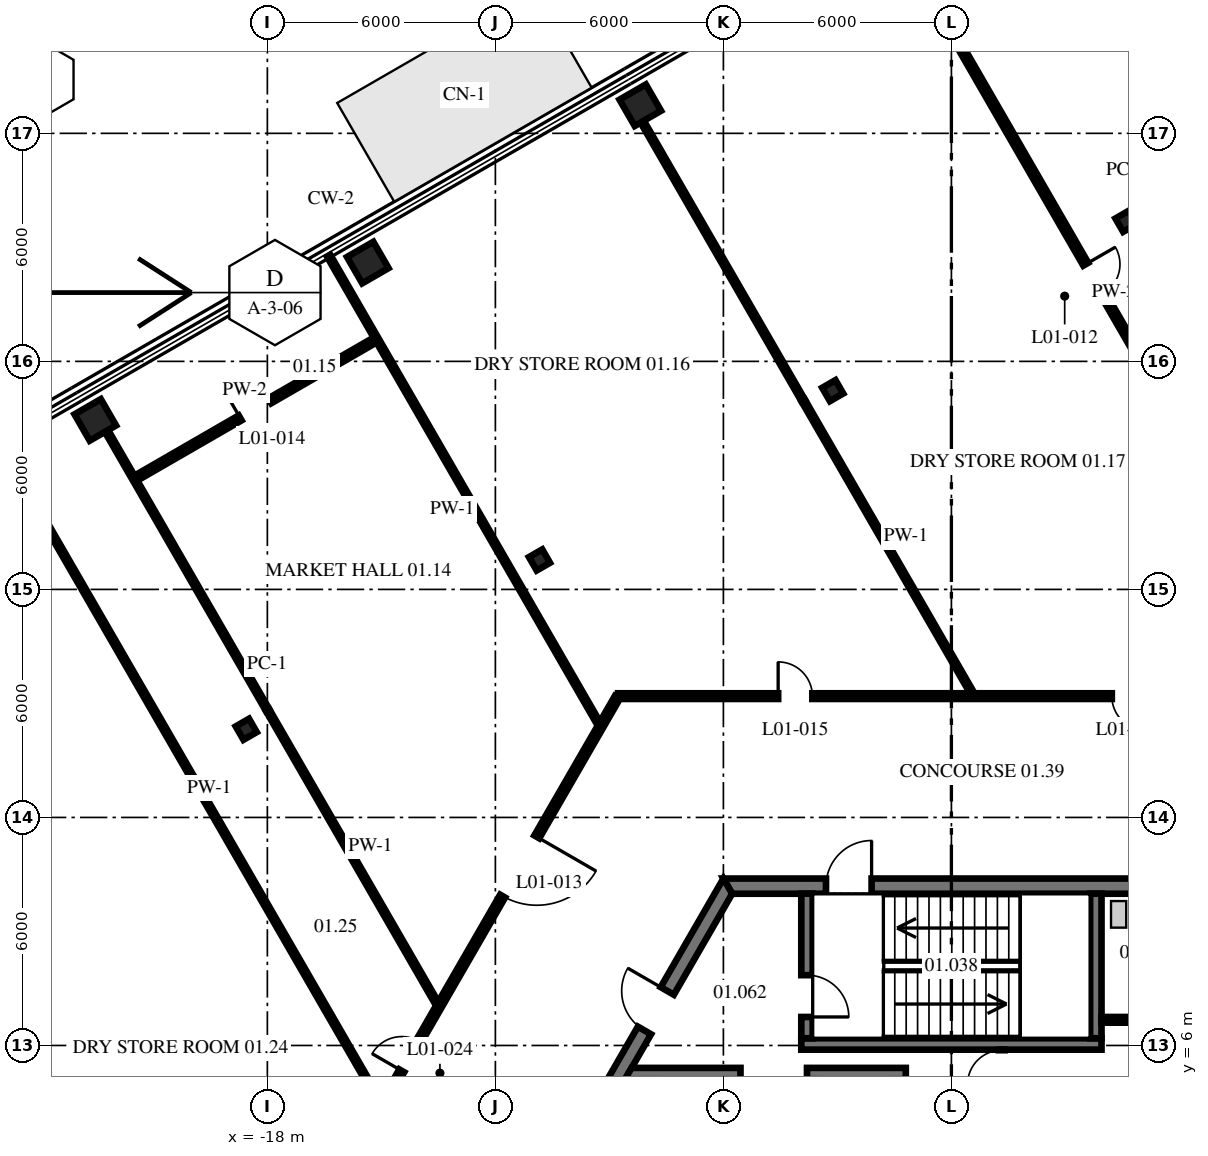
"""IFC4 building model, lengths in metres.
Left out: names, types, materials, properties, quantities, classifications, styles, units other than length and angle.
Written with IfcOpenShell. Run it as: python <this file> out.ifc"""

import sys

from ifc_helpers import new_model, si_unit, direction, frame, frame_2d, origin, origin_2d, place, context, subcontext, project, spatial, polyline, rectangle, i_section, outline, extrude, source, transform, mapped, element, fill, save


model = new_model("IFC4")
c1 = context("Model", 3, precision=1e-05, world=origin(), true_north=direction((0.0, 1.0)))
c2 = subcontext(c1, "Body", "Model", "MODEL_VIEW")
j1 = project(units=[si_unit("LENGTHUNIT", "METRE"), si_unit("PLANEANGLEUNIT", "RADIAN")], contexts=[c1])
p1 = place(None, origin())
s1 = spatial("IfcSite", under=j1, at=p1, CompositionType="ELEMENT")
p2 = place(p1, origin())
s2 = spatial("IfcBuilding", under=s1, at=p2, CompositionType="ELEMENT")
p3 = place(p2, frame((0.0, 0.0, 7.0)))
s3 = spatial("IfcBuildingStorey", under=s2, at=p3, CompositionType="ELEMENT", Elevation=7.0)
m1 = source(origin(), c2, "Body", "SweptSolid", [
    extrude(i_section(OverallWidth=0.404, OverallDepth=0.406, WebThickness=0.027, FlangeThickness=0.044, at=origin_2d()), origin(), (0.0, 0.0, 1.0), 4.5),
])
for number, where, z_axis, x_axis in (
    (1, (4.593, 27.685, 0.0), (0.0, 0.0, 1.0), (-0.866, -0.5, 0.0)),
    (2, (-3.124, 23.23, 0.0), (0.0, 0.0, 1.0), (-0.866, -0.5, 0.0)),
    (3, (-10.84, 18.775, 0.0), (0.0, 0.0, 1.0), (-0.866, -0.5, 0.0)),
    (4, (-18.556, 14.32, 0.0), (0.0, 0.0, 1.0), (-0.866, -0.5, 0.0)),
):
    element("IfcColumn", number, at=place(p3, frame(where, z_axis=z_axis, x_axis=x_axis)), inside=s3, PredefinedType="COLUMN", context=c2, shape_type="MappedRepresentation", body=[
        mapped(m1, transform((0.0, 0.0, 0.0), scale=1.0)),
    ])
m2 = source(origin(), c2, "Body", "SweptSolid", [
    extrude(rectangle(XDim=0.8, YDim=0.8, at=origin_2d()), origin(), (0.0, 0.0, 1.0), 4.5),
])
for number, where, z_axis, x_axis in (
    (5, (-8.187, 30.74, 0.0), (0.0, 0.0, 1.0), (-0.866, -0.5, 0.0)),
    (6, (-15.357, 26.6, 0.0), (0.0, 0.0, 1.0), (-0.866, -0.5, 0.0)),
    (7, (-22.528, 22.46, 0.0), (0.0, 0.0, 1.0), (-0.866, -0.5, 0.0)),
):
    element("IfcColumn", number, at=place(p3, frame(where, z_axis=z_axis, x_axis=x_axis)), inside=s3, PredefinedType="COLUMN", context=c2, shape_type="MappedRepresentation", body=[
        mapped(m2, transform((0.0, 0.0, 0.0), scale=1.0)),
    ])
m3 = source(origin(), c2, "Body", "SweptSolid", [
    extrude(outline(polyline([(-0.115, -0.2), (11.885, -0.2), (11.654, 0.2), (0.115, 0.2), (-0.115, -0.2)])), origin(), (0.0, 0.0, 1.0), 4.3),
])
p4 = place(p3, frame((5.885, 10.192, 0.0), z_axis=(0.0, 0.0, 1.0), x_axis=(-1.0, 0.0, 0.0)))
e8 = element("IfcWall", 8, at=p4, inside=s3, PredefinedType="SHEAR", context=c2, shape_type="MappedRepresentation", body=[
    mapped(m3, transform((0.0, 0.0, 0.0), scale=1.0)),
])
p5 = place(p4, frame((7.985, 0.0, 0.0)))
e9 = element("IfcOpeningElement", 9, at=p5, cuts=e8, PredefinedType="OPENING", context=c2, shape_type="SweptSolid", body=[
    extrude(rectangle(XDim=1.2, YDim=2.1, at=frame_2d((0.6, 1.05))), frame((0.0, 0.21, 0.0), z_axis=(0.0, -1.0, 0.0), x_axis=(1.0, 0.0, 0.0)), (0.0, 0.0, 1.0), 0.42),
])
p6 = place(p3, frame((-5.885, 10.192, 0.0), z_axis=(0.0, 0.0, 1.0), x_axis=(-0.499996592174, -0.866027371285, 0.0)))
e10 = element("IfcWall", 10, at=p6, inside=s3, PredefinedType="SHEAR", context=c2, shape_type="MappedRepresentation", body=[
    mapped(m3, transform((0.0, 0.0, 0.0), scale=1.0)),
])
p7 = place(p6, frame((3.185, 0.0, 0.0)))
e11 = element("IfcOpeningElement", 11, at=p7, cuts=e10, PredefinedType="OPENING", context=c2, shape_type="SweptSolid", body=[
    extrude(rectangle(XDim=1.2, YDim=2.1, at=frame_2d((0.6, 1.05))), frame((0.0, 0.21, 0.0), z_axis=(0.0, -1.0, 0.0), x_axis=(1.0, 0.0, 0.0)), (0.0, 0.0, 1.0), 0.42),
])
m4 = source(origin(), c2, "Body", "SweptSolid", [
    extrude(rectangle(XDim=7.9, YDim=0.3, at=frame_2d((3.95, 0.0))), origin(), (0.0, 0.0, 1.0), 4.3),
])
p8 = place(p3, frame((-3.95, 6.04, 0.0), z_axis=(0.0, 0.0, 1.0), x_axis=(1.0, 0.0, 0.0)))
e12 = element("IfcWall", 12, at=p8, inside=s3, PredefinedType="SHEAR", context=c2, shape_type="MappedRepresentation", body=[
    mapped(m4, transform((0.0, 0.0, 0.0), scale=1.0)),
])
m5 = source(origin(), c2, "Body", "SweptSolid", [
    extrude(outline(polyline([(0.0, -0.15), (0.0, 0.15), (3.804, 0.15), (3.804, -0.15), (0.0, -0.15)])), origin(), (0.0, 0.0, 1.0), 4.3),
])
p9 = place(p3, frame((-3.8, 6.19, 0.0), z_axis=(0.0, 0.0, 1.0), x_axis=(0.0, 1.0, 0.0)))
e13 = element("IfcWall", 13, at=p9, inside=s3, PredefinedType="SHEAR", context=c2, shape_type="MappedRepresentation", body=[
    mapped(m5, transform((0.0, 0.0, 0.0), scale=1.0)),
])
p10 = place(p9, frame((0.56, 0.0, 0.0)))
e14 = element("IfcOpeningElement", 14, at=p10, cuts=e13, PredefinedType="OPENING", context=c2, shape_type="SweptSolid", body=[
    extrude(rectangle(XDim=1.1, YDim=2.1, at=frame_2d((0.55, 1.05))), frame((0.0, 0.16, 0.0), z_axis=(0.0, -1.0, 0.0), x_axis=(1.0, 0.0, 0.0)), (0.0, 0.0, 1.0), 0.32),
])
p11 = place(p3, frame((3.8, 6.19, 0.0), z_axis=(0.0, 0.0, 1.0), x_axis=(0.0, 1.0, 0.0)))
e15 = element("IfcWall", 15, at=p11, inside=s3, PredefinedType="SHEAR", context=c2, shape_type="MappedRepresentation", body=[
    mapped(m5, transform((0.0, 0.0, 0.0), scale=1.0)),
])
m6 = source(origin(), c2, "Body", "SweptSolid", [
    extrude(outline(polyline([(2.6, -0.15), (-0.44, -0.15), (-0.267, 0.15), (2.6, 0.15), (2.6, -0.15)])), origin(), (0.0, 0.0, 1.0), 4.3),
])
p12 = place(p3, frame((-8.15, 5.26, 0.0), z_axis=(0.0, 0.0, 1.0), x_axis=(1.0, 0.0, 0.0)))
e16 = element("IfcWall", 16, at=p12, inside=s3, PredefinedType="SHEAR", context=c2, shape_type="MappedRepresentation", body=[
    mapped(m6, transform((0.0, 0.0, 0.0), scale=1.0)),
])
m7 = source(origin(), c2, "Body", "SweptSolid", [
    extrude(rectangle(XDim=2.6, YDim=0.3, at=frame_2d((1.3, 0.0))), origin(), (0.0, 0.0, 1.0), 4.3),
])
p13 = place(p3, frame((-3.8, 5.26, 0.0), z_axis=(0.0, 0.0, 1.0), x_axis=(1.0, 0.0, 0.0)))
e17 = element("IfcWall", 17, at=p13, inside=s3, PredefinedType="SHEAR", context=c2, shape_type="MappedRepresentation", body=[
    mapped(m7, transform((0.0, 0.0, 0.0), scale=1.0)),
])
m8 = source(origin(), c2, "Body", "SweptSolid", [
    extrude(rectangle(XDim=3.18, YDim=0.15, at=frame_2d((1.59, 0.0))), origin(), (0.0, 0.0, 1.0), 4.3),
])
p14 = place(p3, frame((1.325, 2.71, 0.0), z_axis=(0.0, 0.0, 1.0), x_axis=(0.0, 1.0, 0.0)))
e18 = element("IfcWall", 18, at=p14, inside=s3, PredefinedType="PARTITIONING", context=c2, shape_type="MappedRepresentation", body=[
    mapped(m8, transform((0.0, 0.0, 0.0), scale=1.0)),
])
p15 = place(p14, frame((2.265, 0.0, 0.0)))
e19 = element("IfcOpeningElement", 19, at=p15, cuts=e18, PredefinedType="OPENING", context=c2, shape_type="SweptSolid", body=[
    extrude(rectangle(XDim=0.9, YDim=2.1, at=frame_2d((0.45, 1.05))), frame((0.0, 0.085, 0.0), z_axis=(0.0, -1.0, 0.0), x_axis=(1.0, 0.0, 0.0)), (0.0, 0.0, 1.0), 0.17),
])
m9 = source(origin(), c2, "Body", "SweptSolid", [
    extrude(outline(polyline([(0.0, -0.075), (0.0, 0.075), (3.693, 0.075), (3.78, -0.075), (0.0, -0.075)])), origin(), (0.0, 0.0, 1.0), 4.3),
])
p16 = place(p3, frame((3.95, 6.675, 0.0), z_axis=(0.0, 0.0, 1.0), x_axis=(1.0, 0.0, 0.0)))
e20 = element("IfcWall", 20, at=p16, inside=s3, PredefinedType="PARTITIONING", context=c2, shape_type="MappedRepresentation", body=[
    mapped(m9, transform((0.0, 0.0, 0.0), scale=1.0)),
])
p17 = place(p16, frame((1.6, 0.0, 0.0)))
e21 = element("IfcOpeningElement", 21, at=p17, cuts=e20, PredefinedType="OPENING", context=c2, shape_type="SweptSolid", body=[
    extrude(rectangle(XDim=0.9, YDim=2.1, at=frame_2d((0.45, 1.05))), frame((0.0, 0.085, 0.0), z_axis=(0.0, -1.0, 0.0), x_axis=(1.0, 0.0, 0.0)), (0.0, 0.0, 1.0), 0.17),
])
p18 = place(p3, frame((-31.817, 17.864, 0.0), z_axis=(0.0, 0.0, 1.0), x_axis=(0.500001119364, -0.866024757518, 0.0)))
e22 = element("IfcWall", 22, at=p18, inside=s3, PredefinedType="PARTITIONING", context=c2, shape_type="SweptSolid", body=[
    extrude(rectangle(XDim=20.628, YDim=0.15, at=frame_2d((10.314, 0.0))), origin(), (0.0, 0.0, 1.0), 4.3),
])
p19 = place(p18, frame((10.175, 0.0, 0.0)))
e23 = element("IfcOpeningElement", 23, at=p19, cuts=e22, PredefinedType="OPENING", context=c2, shape_type="SweptSolid", body=[
    extrude(rectangle(XDim=0.9, YDim=2.1, at=frame_2d((0.45, 1.05))), frame((0.0, 0.085, 0.0), z_axis=(0.0, -1.0, 0.0), x_axis=(1.0, 0.0, 0.0)), (0.0, 0.0, 1.0), 0.17),
])
m10 = source(origin(), c2, "Body", "SweptSolid", [
    extrude(rectangle(XDim=20.055, YDim=0.1, at=frame_2d((10.027, 0.0))), origin(), (0.0, 0.0, 1.0), 4.3),
])
p20 = place(p3, frame((-25.017, 21.79, 0.0), z_axis=(0.0, 0.0, 1.0), x_axis=(0.50000802728, -0.866020769183, 0.0)))
e24 = element("IfcWall", 24, at=p20, inside=s3, PredefinedType="PARTITIONING", context=c2, shape_type="MappedRepresentation", body=[
    mapped(m10, transform((0.0, 0.0, 0.0), scale=1.0)),
])
m11 = source(origin(), c2, "Body", "SweptSolid", [
    extrude(rectangle(XDim=8.49, YDim=0.1, at=frame_2d((4.245, 0.0))), origin(), (0.0, 0.0, 1.0), 3.528),
])
p21 = place(p3, frame((-22.238, 22.177, 0.0), z_axis=(0.0, 0.0, 1.0), x_axis=(0.500007862672, -0.866020864221, 0.0)))
e25 = element("IfcWall", 25, at=p21, inside=s3, PredefinedType="PARTITIONING", context=c2, shape_type="MappedRepresentation", body=[
    mapped(m11, transform((0.0, 0.0, 0.0), scale=1.0)),
])
m12 = source(origin(), c2, "Body", "SweptSolid", [
    extrude(rectangle(XDim=8.919, YDim=0.1, at=frame_2d((4.459, 0.0))), origin(), (0.0, 0.0, 1.0), 4.3),
])
p22 = place(p3, frame((-17.993, 14.824, 0.0), z_axis=(0.0, 0.0, 1.0), x_axis=(0.499995733566, -0.866027866997, 0.0)))
e26 = element("IfcWall", 26, at=p22, inside=s3, PredefinedType="PARTITIONING", context=c2, shape_type="MappedRepresentation", body=[
    mapped(m12, transform((0.0, 0.0, 0.0), scale=1.0)),
])
m13 = source(origin(), c2, "Body", "SweptSolid", [
    extrude(rectangle(XDim=14.21, YDim=0.1, at=frame_2d((7.105, 0.0))), origin(), (0.0, 0.0, 1.0), 4.3),
])
p23 = place(p3, frame((-16.384, 26.774, 0.0), z_axis=(0.0, 0.0, 1.0), x_axis=(0.499988175011, -0.866032230837, 0.0)))
e27 = element("IfcWall", 27, at=p23, inside=s3, PredefinedType="PARTITIONING", context=c2, shape_type="MappedRepresentation", body=[
    mapped(m13, transform((0.0, 0.0, 0.0), scale=1.0)),
])
m14 = source(origin(), c2, "Body", "SweptSolid", [
    extrude(rectangle(XDim=8.491, YDim=0.1, at=frame_2d((4.245, 0.0))), origin(), (0.0, 0.0, 1.0), 3.528),
])
p24 = place(p3, frame((-8.141, 30.316, 0.0), z_axis=(0.0, 0.0, 1.0), x_axis=(0.499995411839, -0.866028052744, 0.0)))
e28 = element("IfcWall", 28, at=p24, inside=s3, PredefinedType="PARTITIONING", context=c2, shape_type="MappedRepresentation", body=[
    mapped(m14, transform((0.0, 0.0, 0.0), scale=1.0)),
])
p25 = place(p3, frame((-3.896, 22.963, 0.0), z_axis=(0.0, 0.0, 1.0), x_axis=(0.500014285048, -0.866017156151, 0.0)))
e29 = element("IfcWall", 29, at=p25, inside=s3, PredefinedType="PARTITIONING", context=c2, shape_type="SweptSolid", body=[
    extrude(rectangle(XDim=8.883, YDim=0.1, at=frame_2d((4.441, 0.0))), origin(), (0.0, 0.0, 1.0), 4.3),
])
p26 = place(p3, frame((-1.012, 34.432, 0.0), z_axis=(0.0, 0.0, 1.0), x_axis=(0.500001446062, -0.866024568899, 0.0)))
e30 = element("IfcWall", 30, at=p26, inside=s3, PredefinedType="PARTITIONING", context=c2, shape_type="SweptSolid", body=[
    extrude(rectangle(XDim=19.165, YDim=0.15, at=frame_2d((9.582, 0.0))), origin(), (0.0, 0.0, 1.0), 4.3),
])
p27 = place(p26, frame((9.094, 0.0, 0.0)))
e31 = element("IfcOpeningElement", 31, at=p27, cuts=e30, PredefinedType="OPENING", context=c2, shape_type="SweptSolid", body=[
    extrude(rectangle(XDim=0.9, YDim=2.1, at=frame_2d((0.45, 1.05))), frame((0.0, 0.085, 0.0), z_axis=(0.0, -1.0, 0.0), x_axis=(1.0, 0.0, 0.0)), (0.0, 0.0, 1.0), 0.17),
])
p28 = place(p3, frame((-8.771, 15.192, 0.0), z_axis=(0.0, 0.0, 1.0), x_axis=(1.0, 0.0, 0.0)))
e32 = element("IfcWall", 32, at=p28, inside=s3, PredefinedType="PARTITIONING", context=c2, shape_type="SweptSolid", body=[
    extrude(rectangle(XDim=17.541, YDim=0.15, at=frame_2d((8.771, 0.0))), origin(), (0.0, 0.0, 1.0), 4.3),
])
p29 = place(p28, frame((4.212, 0.0, 0.0)))
e33 = element("IfcOpeningElement", 33, at=p29, cuts=e32, PredefinedType="OPENING", context=c2, shape_type="SweptSolid", body=[
    extrude(rectangle(XDim=0.9, YDim=2.1, at=frame_2d((0.45, 1.05))), frame((0.0, 0.085, 0.0), z_axis=(0.0, -1.0, 0.0), x_axis=(1.0, 0.0, 0.0)), (0.0, 0.0, 1.0), 0.17),
])
p30 = place(p28, frame((12.993, 0.0, 0.0)))
e34 = element("IfcOpeningElement", 34, at=p30, cuts=e32, PredefinedType="OPENING", context=c2, shape_type="SweptSolid", body=[
    extrude(rectangle(XDim=0.9, YDim=2.1, at=frame_2d((0.45, 1.05))), frame((0.0, 0.085, 0.0), z_axis=(0.0, -1.0, 0.0), x_axis=(1.0, 0.0, 0.0)), (0.0, 0.0, 1.0), 0.17),
])
p31 = place(p3, frame((-21.477, 20.918, 0.0), z_axis=(0.0, 0.0, 1.0), x_axis=(0.866028707355, 0.499994278004, 0.0)))
e35 = element("IfcWall", 35, at=p31, inside=s3, PredefinedType="PARTITIONING", context=c2, shape_type="SweptSolid", body=[
    extrude(rectangle(XDim=7.308, YDim=0.15, at=frame_2d((3.654, 0.0))), origin(), (0.0, 0.0, 1.0), 4.3),
])
p32 = place(p31, frame((3.188, 0.0, 0.0)))
e36 = element("IfcOpeningElement", 36, at=p32, cuts=e35, PredefinedType="OPENING", context=c2, shape_type="SweptSolid", body=[
    extrude(rectangle(XDim=0.9, YDim=2.1, at=frame_2d((0.45, 1.05))), frame((0.0, 0.085, 0.0), z_axis=(0.0, -1.0, 0.0), x_axis=(1.0, 0.0, 0.0)), (0.0, 0.0, 1.0), 0.17),
])
p33 = place(p3, frame((-17.518, 0.044, 0.0), z_axis=(0.0, 0.0, 1.0), x_axis=(0.500011872673, 0.866018548985, 0.0)))
e37 = element("IfcWall", 37, at=p33, inside=s3, PredefinedType="PARTITIONING", context=c2, shape_type="SweptSolid", body=[
    extrude(rectangle(XDim=17.452, YDim=0.15, at=frame_2d((8.726, 0.0))), origin(), (0.0, 0.0, 1.0), 4.3),
])
p34 = place(p33, frame((11.417, 0.0, 0.0)))
e38 = element("IfcOpeningElement", 38, at=p34, cuts=e37, PredefinedType="OPENING", context=c2, shape_type="SweptSolid", body=[
    extrude(rectangle(XDim=1.8, YDim=2.4, at=frame_2d((0.9, 1.2))), frame((0.0, 0.085, 0.0), z_axis=(0.0, -1.0, 0.0), x_axis=(1.0, 0.0, 0.0)), (0.0, 0.0, 1.0), 0.17),
])
p35 = place(p33, frame((2.006, 0.0, 0.0)))
e39 = element("IfcOpeningElement", 39, at=p35, cuts=e37, PredefinedType="OPENING", context=c2, shape_type="SweptSolid", body=[
    extrude(rectangle(XDim=0.9, YDim=2.1, at=frame_2d((0.45, 1.05))), frame((0.0, 0.085, 0.0), z_axis=(0.0, -1.0, 0.0), x_axis=(1.0, 0.0, 0.0)), (0.0, 0.0, 1.0), 0.17),
])
p36 = place(p33, frame((6.108, 0.0, 0.0)))
e40 = element("IfcOpeningElement", 40, at=p36, cuts=e37, PredefinedType="OPENING", context=c2, shape_type="SweptSolid", body=[
    extrude(rectangle(XDim=0.9, YDim=2.1, at=frame_2d((0.45, 1.05))), frame((0.0, 0.085, 0.0), z_axis=(0.0, -1.0, 0.0), x_axis=(1.0, 0.0, 0.0)), (0.0, 0.0, 1.0), 0.17),
])
p37 = place(p5, frame((1.2, 0.0, 0.0), z_axis=(0.0, 0.0, 1.0), x_axis=(-1.0, 0.0, 0.0)))
e41 = element("IfcDoor", 41, at=p37, inside=s3, OperationType="SINGLE_SWING_RIGHT", PredefinedType="DOOR", context=c2, shape_type="SweptSolid", body=[
    extrude(rectangle(XDim=1.2, YDim=2.1, at=frame_2d((0.6, 1.05))), frame((0.0, 0.025, 0.0), z_axis=(0.0, -1.0, 0.0), x_axis=(1.0, 0.0, 0.0)), (0.0, 0.0, 1.0), 0.05),
])
fill(e9, e41)
p38 = place(p7, frame((1.2, 0.0, 0.0), z_axis=(0.0, 0.0, 1.0), x_axis=(-1.0, 0.0, 0.0)))
e42 = element("IfcDoor", 42, at=p38, inside=s3, OperationType="SINGLE_SWING_RIGHT", PredefinedType="DOOR", context=c2, shape_type="SweptSolid", body=[
    extrude(rectangle(XDim=1.2, YDim=2.1, at=frame_2d((0.6, 1.05))), frame((0.0, 0.025, 0.0), z_axis=(0.0, -1.0, 0.0), x_axis=(1.0, 0.0, 0.0)), (0.0, 0.0, 1.0), 0.05),
])
fill(e11, e42)
p39 = place(p10, frame((1.1, 0.0, 0.0), z_axis=(0.0, 0.0, 1.0), x_axis=(-1.0, 0.0, 0.0)))
e43 = element("IfcDoor", 43, at=p39, inside=s3, OperationType="SINGLE_SWING_RIGHT", PredefinedType="DOOR", context=c2, shape_type="SweptSolid", body=[
    extrude(rectangle(XDim=1.1, YDim=2.1, at=frame_2d((0.55, 1.05))), frame((0.0, 0.025, 0.0), z_axis=(0.0, -1.0, 0.0), x_axis=(1.0, 0.0, 0.0)), (0.0, 0.0, 1.0), 0.05),
])
fill(e14, e43)
p40 = place(p15, origin())
e44 = element("IfcDoor", 44, at=p40, inside=s3, OperationType="SINGLE_SWING_LEFT", PredefinedType="DOOR", context=c2, shape_type="SweptSolid", body=[
    extrude(rectangle(XDim=0.9, YDim=2.1, at=frame_2d((0.45, 1.05))), frame((0.0, 0.025, 0.0), z_axis=(0.0, -1.0, 0.0), x_axis=(1.0, 0.0, 0.0)), (0.0, 0.0, 1.0), 0.05),
])
fill(e19, e44)
p41 = place(p27, origin())
e45 = element("IfcDoor", 45, at=p41, inside=s3, OperationType="SINGLE_SWING_LEFT", PredefinedType="DOOR", context=c2, shape_type="SweptSolid", body=[
    extrude(rectangle(XDim=0.9, YDim=2.1, at=frame_2d((0.45, 1.05))), frame((0.0, 0.025, 0.0), z_axis=(0.0, -1.0, 0.0), x_axis=(1.0, 0.0, 0.0)), (0.0, 0.0, 1.0), 0.05),
])
fill(e31, e45)
p42 = place(p34, origin())
e46 = element("IfcDoor", 46, at=p42, inside=s3, OperationType="DOUBLE_DOOR_SINGLE_SWING", PredefinedType="DOOR", context=c2, shape_type="SweptSolid", body=[
    extrude(rectangle(XDim=1.8, YDim=2.4, at=frame_2d((0.9, 1.2))), frame((0.0, 0.025, 0.0), z_axis=(0.0, -1.0, 0.0), x_axis=(1.0, 0.0, 0.0)), (0.0, 0.0, 1.0), 0.05),
])
fill(e38, e46)
p43 = place(p32, origin())
e47 = element("IfcDoor", 47, at=p43, inside=s3, OperationType="SINGLE_SWING_LEFT", PredefinedType="DOOR", context=c2, shape_type="SweptSolid", body=[
    extrude(rectangle(XDim=0.9, YDim=2.1, at=frame_2d((0.45, 1.05))), frame((0.0, 0.025, 0.0), z_axis=(0.0, -1.0, 0.0), x_axis=(1.0, 0.0, 0.0)), (0.0, 0.0, 1.0), 0.05),
])
fill(e36, e47)
p44 = place(p29, origin())
e48 = element("IfcDoor", 48, at=p44, inside=s3, OperationType="SINGLE_SWING_LEFT", PredefinedType="DOOR", context=c2, shape_type="SweptSolid", body=[
    extrude(rectangle(XDim=0.9, YDim=2.1, at=frame_2d((0.45, 1.05))), frame((0.0, 0.025, 0.0), z_axis=(0.0, -1.0, 0.0), x_axis=(1.0, 0.0, 0.0)), (0.0, 0.0, 1.0), 0.05),
])
fill(e33, e48)
p45 = place(p30, origin())
e49 = element("IfcDoor", 49, at=p45, inside=s3, OperationType="SINGLE_SWING_RIGHT", PredefinedType="DOOR", context=c2, shape_type="SweptSolid", body=[
    extrude(rectangle(XDim=0.9, YDim=2.1, at=frame_2d((0.45, 1.05))), frame((0.0, 0.025, 0.0), z_axis=(0.0, -1.0, 0.0), x_axis=(1.0, 0.0, 0.0)), (0.0, 0.0, 1.0), 0.05),
])
fill(e34, e49)
p46 = place(p36, origin())
e50 = element("IfcDoor", 50, at=p46, inside=s3, OperationType="SINGLE_SWING_LEFT", PredefinedType="DOOR", context=c2, shape_type="SweptSolid", body=[
    extrude(rectangle(XDim=0.9, YDim=2.1, at=frame_2d((0.45, 1.05))), frame((0.0, 0.025, 0.0), z_axis=(0.0, -1.0, 0.0), x_axis=(1.0, 0.0, 0.0)), (0.0, 0.0, 1.0), 0.05),
])
fill(e40, e50)
save(model, sys.argv[1])
